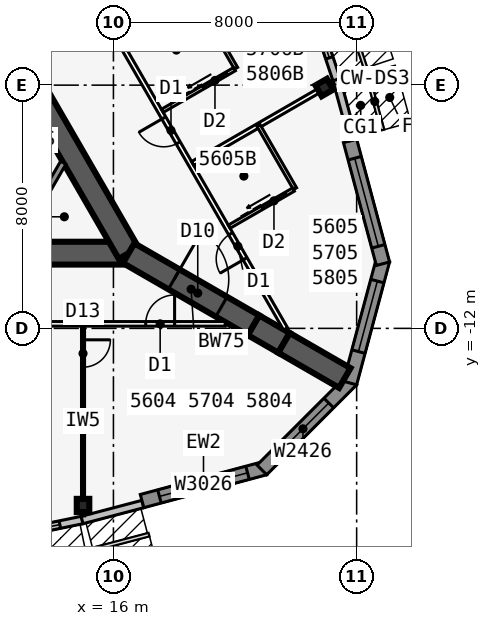
"""IFC4 building model, lengths in metres.
Left out: names, types, materials, properties, quantities, classifications, styles, units other than length and angle.
Written with IfcOpenShell. Run it as: python <this file> out.ifc"""

import sys

from ifc_helpers import new_model, si_unit, direction, frame, frame_2d, origin, origin_2d, place, context, subcontext, project, spatial, polyline, rectangle, i_section, outline, extrude, element, fill, save


model = new_model("IFC4")
c1 = context("Model", 3, precision=1e-05, world=origin(), true_north=direction((0.0, 1.0)))
c2 = subcontext(c1, "Body", "Model", "MODEL_VIEW")
j1 = project(units=[si_unit("LENGTHUNIT", "METRE"), si_unit("PLANEANGLEUNIT", "RADIAN")], contexts=[c1])
p1 = place(None, origin())
s1 = spatial("IfcSite", under=j1, at=p1, CompositionType="ELEMENT")
p2 = place(p1, origin())
s2 = spatial("IfcBuilding", under=s1, at=p2, CompositionType="ELEMENT")
p3 = place(p2, frame((0.0, 0.0, 211.7)))
s3 = spatial("IfcBuildingStorey", under=s2, at=p3, CompositionType="ELEMENT", Elevation=211.7)
p4 = place(p3, frame((-16.5, -9.526, 0.0), z_axis=(0.0, 0.0, 1.0), x_axis=(1.0, 0.0, 0.0)))
e1 = element("IfcWall", 1, at=p4, inside=s3, PredefinedType="SHEAR", context=c2, shape_type="SweptSolid", body=[
    extrude(rectangle(XDim=33.0, YDim=0.75, at=frame_2d((16.5, 0.0))), origin(), (0.0, 0.0, 1.0), 3.6),
])
p5 = place(p4, frame((14.05, 0.0, 0.0)))
e2 = element("IfcOpeningElement", 2, at=p5, cuts=e1, PredefinedType="OPENING", context=c2, shape_type="SweptSolid", body=[
    extrude(rectangle(XDim=1.8, YDim=2.13, at=frame_2d((0.9, 1.065))), frame((0.0, 0.385, 0.0), z_axis=(0.0, -1.0, 0.0), x_axis=(1.0, 0.0, 0.0)), (0.0, 0.0, 1.0), 0.77),
])
p6 = place(p3, frame((16.5, -9.526, 0.0), z_axis=(0.0, 0.0, 1.0), x_axis=(-0.499999749417, 0.866025548458, 0.0)))
e3 = element("IfcWall", 3, at=p6, inside=s3, PredefinedType="SHEAR", context=c2, shape_type="SweptSolid", body=[
    extrude(rectangle(XDim=33.0, YDim=0.75, at=frame_2d((16.5, 0.0))), origin(), (0.0, 0.0, 1.0), 3.6),
])
p7 = place(p6, frame((14.15, 0.0, 0.0)))
e4 = element("IfcOpeningElement", 4, at=p7, cuts=e3, PredefinedType="OPENING", context=c2, shape_type="SweptSolid", body=[
    extrude(rectangle(XDim=1.8, YDim=2.13, at=frame_2d((0.9, 1.065))), frame((0.0, 0.385, 0.0), z_axis=(0.0, -1.0, 0.0), x_axis=(1.0, 0.0, 0.0)), (0.0, 0.0, 1.0), 0.77),
])
p8 = place(p6, frame((12.6, 0.0, 0.0)))
e5 = element("IfcOpeningElement", 5, at=p8, cuts=e3, PredefinedType="OPENING", context=c2, shape_type="SweptSolid", body=[
    extrude(rectangle(XDim=1.0, YDim=2.13, at=frame_2d((0.5, 1.065))), frame((0.0, 0.385, 0.0), z_axis=(0.0, -1.0, 0.0), x_axis=(1.0, 0.0, 0.0)), (0.0, 0.0, 1.0), 0.77),
])
p9 = place(p3, frame((16.5, -9.526, 0.0), z_axis=(0.0, 0.0, 1.0), x_axis=(0.866031398331, -0.499989616998, 0.0)))
e6 = element("IfcWall", 6, at=p9, inside=s3, PredefinedType="SHEAR", context=c2, shape_type="SweptSolid", body=[
    extrude(rectangle(XDim=4.746, YDim=0.75, at=frame_2d((2.373, 0.0))), origin(), (0.0, 0.0, 1.0), 3.6),
])
p10 = place(p9, frame((1.725, 0.0, 0.0)))
e7 = element("IfcOpeningElement", 7, at=p10, cuts=e6, PredefinedType="OPENING", context=c2, shape_type="SweptSolid", body=[
    extrude(rectangle(XDim=1.8, YDim=2.13, at=frame_2d((0.9, 1.065))), frame((0.0, 0.385, 0.0), z_axis=(0.0, -1.0, 0.0), x_axis=(1.0, 0.0, 0.0)), (0.0, 0.0, 1.0), 0.77),
])
p11 = place(p3, frame((20.61, -11.899, 0.0), z_axis=(0.0, 0.0, 1.0), x_axis=(0.866009537788, -0.500027479704, 0.0)))
e8 = element("IfcWall", 8, at=p11, inside=s3, PredefinedType="SHEAR", context=c2, shape_type="SweptSolid", body=[
    extrude(rectangle(XDim=1.155, YDim=0.75, at=frame_2d((0.577, 0.0))), origin(), (0.0, 0.0, 1.0), 3.6),
])
p12 = place(p3, frame((21.61, -12.477, 0.0), z_axis=(0.0, 0.0, 1.0), x_axis=(0.866055313784, -0.499948190782, 0.0)))
e9 = element("IfcWall", 9, at=p12, inside=s3, PredefinedType="SHEAR", context=c2, shape_type="SweptSolid", body=[
    extrude(rectangle(XDim=2.309, YDim=0.75, at=frame_2d((1.155, 0.0))), origin(), (0.0, 0.0, 1.0), 3.6),
])
for number, where, z_axis, x_axis in (
    (10, (15.0, -17.825, 0.0), (0.0, 0.0, 1.0), (1.0, 0.0, 0.0)),
    (11, (22.937, -4.078, 0.0), (0.0, 0.0, 1.0), (-0.5, 0.866, 0.0)),
):
    element("IfcColumn", number, at=place(p3, frame(where, z_axis=z_axis, x_axis=x_axis)), inside=s3, PredefinedType="COLUMN", context=c2, shape_type="SweptSolid", body=[
        extrude(i_section(OverallWidth=0.411, OverallDepth=0.434, WebThickness=0.036, FlangeThickness=0.057, at=origin_2d()), origin(), (0.0, 0.0, 1.0), 3.6),
    ])
p13 = place(p3, frame((9.975, -19.332, 0.0), z_axis=(0.0, 0.0, 1.0), x_axis=(0.979461488189, 0.201631329795, 0.0)))
e12 = element("IfcWall", 12, at=p13, inside=s3, PredefinedType="STANDARD", context=c2, shape_type="SweptSolid", body=[
    extrude(rectangle(XDim=5.105, YDim=0.25, at=frame_2d((2.552, 0.0))), origin(), (0.0, 0.0, 1.0), 3.435),
])
p14 = place(p13, frame((0.752, 0.0, 0.45)))
e13 = element("IfcOpeningElement", 13, at=p14, cuts=e12, PredefinedType="OPENING", context=c2, shape_type="SweptSolid", body=[
    extrude(rectangle(XDim=3.6, YDim=2.6, at=frame_2d((1.8, 1.3))), frame((0.0, 0.135, 0.0), z_axis=(0.0, -1.0, 0.0), x_axis=(1.0, 0.0, 0.0)), (0.0, 0.0, 1.0), 0.27),
])
p15 = place(p3, frame((14.968, -18.304, 0.0), z_axis=(0.0, 0.0, 1.0), x_axis=(0.967010286052, 0.254737328772, 0.0)))
e14 = element("IfcWall", 14, at=p15, inside=s3, PredefinedType="STANDARD", context=c2, shape_type="SweptSolid", body=[
    extrude(rectangle(XDim=2.068, YDim=0.25, at=frame_2d((1.034, 0.0))), origin(), (0.0, 0.0, 1.0), 3.435),
])
p16 = place(p3, frame((16.942, -17.681, 0.0), z_axis=(0.0, 0.0, 1.0), x_axis=(0.965920442324, 0.258839137498, 0.0)))
e15 = element("IfcWall", 15, at=p16, inside=s3, PredefinedType="SOLIDWALL", context=c2, shape_type="SweptSolid", body=[
    extrude(rectangle(XDim=4.184, YDim=0.45, at=frame_2d((2.092, 0.0))), origin(), (0.0, 0.0, 1.0), 3.435),
])
p17 = place(p16, frame((0.592, 0.0, 0.45)))
e16 = element("IfcOpeningElement", 16, at=p17, cuts=e15, PredefinedType="OPENING", context=c2, shape_type="SweptSolid", body=[
    extrude(rectangle(XDim=3.0, YDim=2.6, at=frame_2d((1.5, 1.3))), frame((0.0, 0.235, 0.0), z_axis=(0.0, -1.0, 0.0), x_axis=(1.0, 0.0, 0.0)), (0.0, 0.0, 1.0), 0.47),
])
p18 = place(p3, frame((20.882, -16.656, 0.0), z_axis=(0.0, 0.0, 1.0), x_axis=(0.707077605902, 0.707135955267, 0.0)))
e17 = element("IfcWall", 17, at=p18, inside=s3, PredefinedType="SOLIDWALL", context=c2, shape_type="SweptSolid", body=[
    extrude(outline(polyline([(4.184, 0.225), (4.125, 0.225), (3.705, 0.113), (3.675, 0.225), (0.0, 0.225), (0.0, -0.225), (4.184, -0.225), (4.184, 0.225)])), origin(), (0.0, 0.0, 1.0), 3.435),
])
p19 = place(p18, frame((0.713, 0.0, 0.45)))
e18 = element("IfcOpeningElement", 18, at=p19, cuts=e17, PredefinedType="OPENING", context=c2, shape_type="SweptSolid", body=[
    extrude(rectangle(XDim=2.4, YDim=2.6, at=frame_2d((1.2, 1.3))), frame((0.0, 0.235, 0.0), z_axis=(0.0, -1.0, 0.0), x_axis=(1.0, 0.0, 0.0)), (0.0, 0.0, 1.0), 0.47),
])
p20 = place(p3, frame((23.783, -13.798, 0.0), z_axis=(0.0, 0.0, 1.0), x_axis=(0.258799282522, 0.96593112144, 0.0)))
e19 = element("IfcWall", 19, at=p20, inside=s3, PredefinedType="SOLIDWALL", context=c2, shape_type="SweptSolid", body=[
    extrude(outline(polyline([(4.184, 0.225), (0.509, 0.225), (0.479, 0.113), (0.059, 0.225), (0.0, 0.225), (0.0, -0.225), (4.184, -0.225), (4.184, 0.225)])), origin(), (0.0, 0.0, 1.0), 3.435),
])
p21 = place(p20, frame((1.071, 0.0, 0.45)))
e20 = element("IfcOpeningElement", 20, at=p21, cuts=e19, PredefinedType="OPENING", context=c2, shape_type="SweptSolid", body=[
    extrude(rectangle(XDim=2.4, YDim=2.6, at=frame_2d((1.2, 1.3))), frame((0.0, 0.235, 0.0), z_axis=(0.0, -1.0, 0.0), x_axis=(1.0, 0.0, 0.0)), (0.0, 0.0, 1.0), 0.47),
])
p22 = place(p3, frame((24.865, -9.873, 0.0), z_axis=(0.0, 0.0, 1.0), x_axis=(-0.258784695888, 0.965935029479, 0.0)))
e21 = element("IfcWall", 21, at=p22, inside=s3, PredefinedType="SOLIDWALL", context=c2, shape_type="SweptSolid", body=[
    extrude(rectangle(XDim=4.184, YDim=0.45, at=frame_2d((2.092, 0.0))), origin(), (0.0, 0.0, 1.0), 3.435),
])
p23 = place(p22, frame((0.592, 0.0, 0.45)))
e22 = element("IfcOpeningElement", 22, at=p23, cuts=e21, PredefinedType="OPENING", context=c2, shape_type="SweptSolid", body=[
    extrude(rectangle(XDim=3.0, YDim=2.6, at=frame_2d((1.5, 1.3))), frame((0.0, 0.235, 0.0), z_axis=(0.0, -1.0, 0.0), x_axis=(1.0, 0.0, 0.0)), (0.0, 0.0, 1.0), 0.47),
])
p24 = place(p3, frame((23.879, -5.806, 0.0), z_axis=(0.0, 0.0, 1.0), x_axis=(-0.262867703986, 0.964831887015, 0.0)))
e23 = element("IfcWall", 23, at=p24, inside=s3, PredefinedType="STANDARD", context=c2, shape_type="SweptSolid", body=[
    extrude(rectangle(XDim=2.068, YDim=0.25, at=frame_2d((1.034, 0.0))), origin(), (0.0, 0.0, 1.0), 3.435),
])
p25 = place(p3, frame((23.338, -3.817, 0.0), z_axis=(0.0, 0.0, 1.0), x_axis=(-0.315108478109, 0.949055660656, 0.0)))
e24 = element("IfcWall", 24, at=p25, inside=s3, PredefinedType="STANDARD", context=c2, shape_type="SweptSolid", body=[
    extrude(rectangle(XDim=5.105, YDim=0.25, at=frame_2d((2.552, 0.0))), origin(), (0.0, 0.0, 1.0), 3.435),
])
p26 = place(p25, frame((0.752, 0.0, 0.45)))
e25 = element("IfcOpeningElement", 25, at=p26, cuts=e24, PredefinedType="OPENING", context=c2, shape_type="SweptSolid", body=[
    extrude(rectangle(XDim=3.6, YDim=2.6, at=frame_2d((1.8, 1.3))), frame((0.0, 0.135, 0.0), z_axis=(0.0, -1.0, 0.0), x_axis=(1.0, 0.0, 0.0)), (0.0, 0.0, 1.0), 0.27),
])
p27 = place(p3, frame((-19.677, -11.851, 0.0), z_axis=(0.0, 0.0, 1.0), x_axis=(1.0, 0.0, 0.0)))
e26 = element("IfcWall", 26, at=p27, inside=s3, PredefinedType="PARTITIONING", context=c2, shape_type="SweptSolid", body=[
    extrude(rectangle(XDim=39.354, YDim=0.15, at=frame_2d((19.677, 0.0))), origin(), (0.0, 0.0, 1.0), 3.435),
])
p28 = place(p27, frame((1.665, 0.0, 0.0)))
e27 = element("IfcOpeningElement", 27, at=p28, cuts=e26, PredefinedType="OPENING", context=c2, shape_type="SweptSolid", body=[
    extrude(rectangle(XDim=0.95, YDim=2.13, at=frame_2d((0.475, 1.065))), frame((0.0, 0.085, 0.0), z_axis=(0.0, -1.0, 0.0), x_axis=(1.0, 0.0, 0.0)), (0.0, 0.0, 1.0), 0.17),
])
p29 = place(p27, frame((11.702, 0.0, 0.0)))
e28 = element("IfcOpeningElement", 28, at=p29, cuts=e26, PredefinedType="OPENING", context=c2, shape_type="SweptSolid", body=[
    extrude(rectangle(XDim=0.95, YDim=2.13, at=frame_2d((0.475, 1.065))), frame((0.0, 0.085, 0.0), z_axis=(0.0, -1.0, 0.0), x_axis=(1.0, 0.0, 0.0)), (0.0, 0.0, 1.0), 0.17),
])
p30 = place(p27, frame((21.677, 0.0, 0.0)))
e29 = element("IfcOpeningElement", 29, at=p30, cuts=e26, PredefinedType="OPENING", context=c2, shape_type="SweptSolid", body=[
    extrude(rectangle(XDim=1.0, YDim=2.13, at=frame_2d((0.5, 1.065))), frame((0.0, 0.085, 0.0), z_axis=(0.0, -1.0, 0.0), x_axis=(1.0, 0.0, 0.0)), (0.0, 0.0, 1.0), 0.17),
])
p31 = place(p27, frame((26.102, 0.0, 0.0)))
e30 = element("IfcOpeningElement", 30, at=p31, cuts=e26, PredefinedType="OPENING", context=c2, shape_type="SweptSolid", body=[
    extrude(rectangle(XDim=0.95, YDim=2.13, at=frame_2d((0.475, 1.065))), frame((0.0, 0.085, 0.0), z_axis=(0.0, -1.0, 0.0), x_axis=(1.0, 0.0, 0.0)), (0.0, 0.0, 1.0), 0.17),
])
p32 = place(p27, frame((36.739, 0.0, 0.0)))
e31 = element("IfcOpeningElement", 31, at=p32, cuts=e26, PredefinedType="OPENING", context=c2, shape_type="SweptSolid", body=[
    extrude(rectangle(XDim=0.95, YDim=2.13, at=frame_2d((0.475, 1.065))), frame((0.0, 0.085, 0.0), z_axis=(0.0, -1.0, 0.0), x_axis=(1.0, 0.0, 0.0)), (0.0, 0.0, 1.0), 0.17),
])
p33 = place(p3, frame((15.0, -11.926, 0.0), z_axis=(0.0, 0.0, 1.0), x_axis=(0.0, -1.0, 0.0)))
e32 = element("IfcWall", 32, at=p33, inside=s3, PredefinedType="PARTITIONING", context=c2, shape_type="SweptSolid", body=[
    extrude(rectangle(XDim=6.24, YDim=0.1, at=frame_2d((3.12, 0.0))), origin(), (0.0, 0.0, 1.0), 2.589),
])
p34 = place(p33, frame((0.45, 0.0, 0.0)))
e33 = element("IfcOpeningElement", 33, at=p34, cuts=e32, PredefinedType="OPENING", context=c2, shape_type="SweptSolid", body=[
    extrude(rectangle(XDim=0.9, YDim=2.13, at=frame_2d((0.45, 1.065))), frame((0.0, 0.06, 0.0), z_axis=(0.0, -1.0, 0.0), x_axis=(1.0, 0.0, 0.0)), (0.0, 0.0, 1.0), 0.12),
])
p35 = place(p3, frame((21.661, -12.015, 0.0), z_axis=(0.0, 0.0, 1.0), x_axis=(-0.500000605707, 0.866025054079, 0.0)))
e34 = element("IfcWall", 34, at=p35, inside=s3, PredefinedType="PARTITIONING", context=c2, shape_type="SweptSolid", body=[
    extrude(rectangle(XDim=42.472, YDim=0.15, at=frame_2d((21.236, 0.0))), origin(), (0.0, 0.0, 1.0), 3.435),
])
p36 = place(p35, frame((2.661, 0.0, 0.0)))
e35 = element("IfcOpeningElement", 35, at=p36, cuts=e34, PredefinedType="OPENING", context=c2, shape_type="SweptSolid", body=[
    extrude(rectangle(XDim=0.95, YDim=2.13, at=frame_2d((0.475, 1.065))), frame((0.0, 0.085, 0.0), z_axis=(0.0, -1.0, 0.0), x_axis=(1.0, 0.0, 0.0)), (0.0, 0.0, 1.0), 0.17),
])
p37 = place(p35, frame((7.061, 0.0, 0.0)))
e36 = element("IfcOpeningElement", 36, at=p37, cuts=e34, PredefinedType="OPENING", context=c2, shape_type="SweptSolid", body=[
    extrude(rectangle(XDim=0.95, YDim=2.13, at=frame_2d((0.475, 1.065))), frame((0.0, 0.085, 0.0), z_axis=(0.0, -1.0, 0.0), x_axis=(1.0, 0.0, 0.0)), (0.0, 0.0, 1.0), 0.17),
])
p38 = place(p35, frame((13.861, 0.0, 0.0)))
e37 = element("IfcOpeningElement", 37, at=p38, cuts=e34, PredefinedType="OPENING", context=c2, shape_type="SweptSolid", body=[
    extrude(rectangle(XDim=0.95, YDim=2.13, at=frame_2d((0.475, 1.065))), frame((0.0, 0.085, 0.0), z_axis=(0.0, -1.0, 0.0), x_axis=(1.0, 0.0, 0.0)), (0.0, 0.0, 1.0), 0.17),
])
p39 = place(p35, frame((22.061, 0.0, 0.0)))
e38 = element("IfcOpeningElement", 38, at=p39, cuts=e34, PredefinedType="OPENING", context=c2, shape_type="SweptSolid", body=[
    extrude(rectangle(XDim=0.95, YDim=2.13, at=frame_2d((0.475, 1.065))), frame((0.0, 0.085, 0.0), z_axis=(0.0, -1.0, 0.0), x_axis=(1.0, 0.0, 0.0)), (0.0, 0.0, 1.0), 0.17),
])
p40 = place(p35, frame((28.261, 0.0, 0.0)))
e39 = element("IfcOpeningElement", 39, at=p40, cuts=e34, PredefinedType="OPENING", context=c2, shape_type="SweptSolid", body=[
    extrude(rectangle(XDim=0.95, YDim=2.13, at=frame_2d((0.475, 1.065))), frame((0.0, 0.085, 0.0), z_axis=(0.0, -1.0, 0.0), x_axis=(1.0, 0.0, 0.0)), (0.0, 0.0, 1.0), 0.17),
])
p41 = place(p35, frame((38.861, 0.0, 0.0)))
e40 = element("IfcOpeningElement", 40, at=p41, cuts=e34, PredefinedType="OPENING", context=c2, shape_type="SweptSolid", body=[
    extrude(rectangle(XDim=0.95, YDim=2.13, at=frame_2d((0.475, 1.065))), frame((0.0, 0.085, 0.0), z_axis=(0.0, -1.0, 0.0), x_axis=(1.0, 0.0, 0.0)), (0.0, 0.0, 1.0), 0.17),
])
p42 = place(p3, frame((18.608, -6.577, 0.0), z_axis=(0.0, 0.0, 1.0), x_axis=(0.866028745538, 0.499994211868, 0.0)))
e41 = element("IfcWall", 41, at=p42, inside=s3, PredefinedType="PARTITIONING", context=c2, shape_type="SweptSolid", body=[
    extrude(rectangle(XDim=5.34, YDim=0.15, at=frame_2d((2.67, 0.0))), origin(), (0.0, 0.0, 1.0), 2.589),
])
p43 = place(p3, frame((21.973, -7.406, 0.0), z_axis=(0.0, 0.0, 1.0), x_axis=(-0.499957262057, 0.866050077142, 0.0)))
e42 = element("IfcWall", 42, at=p43, inside=s3, PredefinedType="PLUMBINGWALL", context=c2, shape_type="SweptSolid", body=[
    extrude(rectangle(XDim=2.4, YDim=0.12, at=frame_2d((1.2, 0.0))), origin(), (0.0, 0.0, 1.0), 3.435),
])
p44 = place(p3, frame((19.808, -8.656, 0.0), z_axis=(0.0, 0.0, 1.0), x_axis=(0.866023955769, 0.500002508028, 0.0)))
e43 = element("IfcWall", 43, at=p44, inside=s3, PredefinedType="PLUMBINGWALL", context=c2, shape_type="SweptSolid", body=[
    extrude(rectangle(XDim=2.44, YDim=0.12, at=frame_2d((1.22, 0.0))), origin(), (0.0, 0.0, 1.0), 3.435),
])
p45 = place(p44, frame((1.25, 0.0, 0.0)))
e44 = element("IfcOpeningElement", 44, at=p45, cuts=e43, PredefinedType="OPENING", context=c2, shape_type="SweptSolid", body=[
    extrude(rectangle(XDim=0.9, YDim=2.13, at=frame_2d((0.45, 1.065))), frame((0.0, 0.07, 0.0), z_axis=(0.0, -1.0, 0.0), x_axis=(1.0, 0.0, 0.0)), (0.0, 0.0, 1.0), 0.14),
])
p46 = place(p3, frame((20.033, -3.445, 0.0), z_axis=(0.0, 0.0, 1.0), x_axis=(-0.499990139034, 0.866031096941, 0.0)))
e45 = element("IfcWall", 45, at=p46, inside=s3, PredefinedType="PLUMBINGWALL", context=c2, shape_type="SweptSolid", body=[
    extrude(rectangle(XDim=3.0, YDim=0.12, at=frame_2d((1.5, 0.0))), origin(), (0.0, 0.0, 1.0), 3.435),
])
p47 = place(p3, frame((17.608, -4.845, 0.0), z_axis=(0.0, 0.0, 1.0), x_axis=(0.865997131366, 0.500048966069, 0.0)))
e46 = element("IfcWall", 46, at=p47, inside=s3, PredefinedType="PLUMBINGWALL", context=c2, shape_type="SweptSolid", body=[
    extrude(rectangle(XDim=2.74, YDim=0.12, at=frame_2d((1.37, 0.0))), origin(), (0.0, 0.0, 1.0), 3.435),
])
p48 = place(p47, frame((1.55, 0.0, 0.0)))
e47 = element("IfcOpeningElement", 47, at=p48, cuts=e46, PredefinedType="OPENING", context=c2, shape_type="SweptSolid", body=[
    extrude(rectangle(XDim=0.9, YDim=2.13, at=frame_2d((0.45, 1.065))), frame((0.0, 0.07, 0.0), z_axis=(0.0, -1.0, 0.0), x_axis=(1.0, 0.0, 0.0)), (0.0, 0.0, 1.0), 0.14),
])
p49 = place(p3, frame((14.349, -6.551, 0.0), z_axis=(0.0, 0.0, 1.0), x_axis=(-0.499952404951, -0.866052881055, 0.0)))
e48 = element("IfcWall", 48, at=p49, inside=s3, PredefinedType="SOLIDWALL", context=c2, shape_type="SweptSolid", body=[
    extrude(rectangle(XDim=3.002, YDim=0.2, at=frame_2d((1.501, 0.0))), origin(), (0.0, 0.0, 1.0), 3.435),
])
p50 = place(p14, origin())
e49 = element("IfcWindow", 49, at=p50, inside=s3, PartitioningType="SINGLE_PANEL", PredefinedType="WINDOW", context=c2, shape_type="SweptSolid", body=[
    extrude(rectangle(XDim=3.6, YDim=2.6, at=frame_2d((1.8, 1.3))), frame((0.0, 0.03, 0.0), z_axis=(0.0, -1.0, 0.0), x_axis=(1.0, 0.0, 0.0)), (0.0, 0.0, 1.0), 0.06),
])
fill(e13, e49)
p51 = place(p17, origin())
e50 = element("IfcWindow", 50, at=p51, inside=s3, PartitioningType="SINGLE_PANEL", PredefinedType="WINDOW", context=c2, shape_type="SweptSolid", body=[
    extrude(rectangle(XDim=3.0, YDim=2.6, at=frame_2d((1.5, 1.3))), frame((0.0, 0.03, 0.0), z_axis=(0.0, -1.0, 0.0), x_axis=(1.0, 0.0, 0.0)), (0.0, 0.0, 1.0), 0.06),
])
fill(e16, e50)
p52 = place(p19, origin())
e51 = element("IfcWindow", 51, at=p52, inside=s3, PartitioningType="SINGLE_PANEL", PredefinedType="WINDOW", context=c2, shape_type="SweptSolid", body=[
    extrude(rectangle(XDim=2.4, YDim=2.6, at=frame_2d((1.2, 1.3))), frame((0.0, 0.03, 0.0), z_axis=(0.0, -1.0, 0.0), x_axis=(1.0, 0.0, 0.0)), (0.0, 0.0, 1.0), 0.06),
])
fill(e18, e51)
p53 = place(p21, origin())
e52 = element("IfcWindow", 52, at=p53, inside=s3, PartitioningType="SINGLE_PANEL", PredefinedType="WINDOW", context=c2, shape_type="SweptSolid", body=[
    extrude(rectangle(XDim=2.4, YDim=2.6, at=frame_2d((1.2, 1.3))), frame((0.0, 0.03, 0.0), z_axis=(0.0, -1.0, 0.0), x_axis=(1.0, 0.0, 0.0)), (0.0, 0.0, 1.0), 0.06),
])
fill(e20, e52)
p54 = place(p23, origin())
e53 = element("IfcWindow", 53, at=p54, inside=s3, PartitioningType="SINGLE_PANEL", PredefinedType="WINDOW", context=c2, shape_type="SweptSolid", body=[
    extrude(rectangle(XDim=3.0, YDim=2.6, at=frame_2d((1.5, 1.3))), frame((0.0, 0.03, 0.0), z_axis=(0.0, -1.0, 0.0), x_axis=(1.0, 0.0, 0.0)), (0.0, 0.0, 1.0), 0.06),
])
fill(e22, e53)
p55 = place(p26, origin())
e54 = element("IfcWindow", 54, at=p55, inside=s3, PartitioningType="SINGLE_PANEL", PredefinedType="WINDOW", context=c2, shape_type="SweptSolid", body=[
    extrude(rectangle(XDim=3.6, YDim=2.6, at=frame_2d((1.8, 1.3))), frame((0.0, 0.03, 0.0), z_axis=(0.0, -1.0, 0.0), x_axis=(1.0, 0.0, 0.0)), (0.0, 0.0, 1.0), 0.06),
])
fill(e25, e54)
p56 = place(p34, origin())
e55 = element("IfcDoor", 55, at=p56, inside=s3, OperationType="SINGLE_SWING_LEFT", PredefinedType="DOOR", context=c2, shape_type="SweptSolid", body=[
    extrude(rectangle(XDim=0.9, YDim=2.13, at=frame_2d((0.45, 1.065))), frame((0.0, 0.025, 0.0), z_axis=(0.0, -1.0, 0.0), x_axis=(1.0, 0.0, 0.0)), (0.0, 0.0, 1.0), 0.05),
])
fill(e33, e55)
p57 = place(p32, origin())
e56 = element("IfcDoor", 56, at=p57, inside=s3, OperationType="SINGLE_SWING_RIGHT", PredefinedType="DOOR", context=c2, shape_type="SweptSolid", body=[
    extrude(rectangle(XDim=0.95, YDim=2.13, at=frame_2d((0.475, 1.065))), frame((0.0, 0.025, 0.0), z_axis=(0.0, -1.0, 0.0), x_axis=(1.0, 0.0, 0.0)), (0.0, 0.0, 1.0), 0.05),
])
fill(e31, e56)
p58 = place(p45, origin())
e57 = element("IfcDoor", 57, at=p58, inside=s3, OperationType="SLIDING_TO_LEFT", PredefinedType="DOOR", context=c2, shape_type="SweptSolid", body=[
    extrude(rectangle(XDim=0.9, YDim=2.13, at=frame_2d((0.45, 1.065))), frame((0.0, 0.025, 0.0), z_axis=(0.0, -1.0, 0.0), x_axis=(1.0, 0.0, 0.0)), (0.0, 0.0, 1.0), 0.05),
])
fill(e44, e57)
p59 = place(p36, origin())
e58 = element("IfcDoor", 58, at=p59, inside=s3, OperationType="SINGLE_SWING_LEFT", PredefinedType="DOOR", context=c2, shape_type="SweptSolid", body=[
    extrude(rectangle(XDim=0.95, YDim=2.13, at=frame_2d((0.475, 1.065))), frame((0.0, 0.025, 0.0), z_axis=(0.0, -1.0, 0.0), x_axis=(1.0, 0.0, 0.0)), (0.0, 0.0, 1.0), 0.05),
])
fill(e35, e58)
p60 = place(p48, origin())
e59 = element("IfcDoor", 59, at=p60, inside=s3, OperationType="SLIDING_TO_LEFT", PredefinedType="DOOR", context=c2, shape_type="SweptSolid", body=[
    extrude(rectangle(XDim=0.9, YDim=2.13, at=frame_2d((0.45, 1.065))), frame((0.0, 0.025, 0.0), z_axis=(0.0, -1.0, 0.0), x_axis=(1.0, 0.0, 0.0)), (0.0, 0.0, 1.0), 0.05),
])
fill(e47, e59)
p61 = place(p37, origin())
e60 = element("IfcDoor", 60, at=p61, inside=s3, OperationType="SINGLE_SWING_RIGHT", PredefinedType="DOOR", context=c2, shape_type="SweptSolid", body=[
    extrude(rectangle(XDim=0.95, YDim=2.13, at=frame_2d((0.475, 1.065))), frame((0.0, 0.025, 0.0), z_axis=(0.0, -1.0, 0.0), x_axis=(1.0, 0.0, 0.0)), (0.0, 0.0, 1.0), 0.05),
])
fill(e36, e60)
p62 = place(p10, origin())
e61 = element("IfcDoor", 61, at=p62, inside=s3, OperationType="DOUBLE_DOOR_DOUBLE_SWING", PredefinedType="DOOR", context=c2, shape_type="SweptSolid", body=[
    extrude(rectangle(XDim=1.8, YDim=2.13, at=frame_2d((0.9, 1.065))), frame((0.0, 0.025, 0.0), z_axis=(0.0, -1.0, 0.0), x_axis=(1.0, 0.0, 0.0)), (0.0, 0.0, 1.0), 0.05),
])
fill(e7, e61)
save(model, sys.argv[1])
